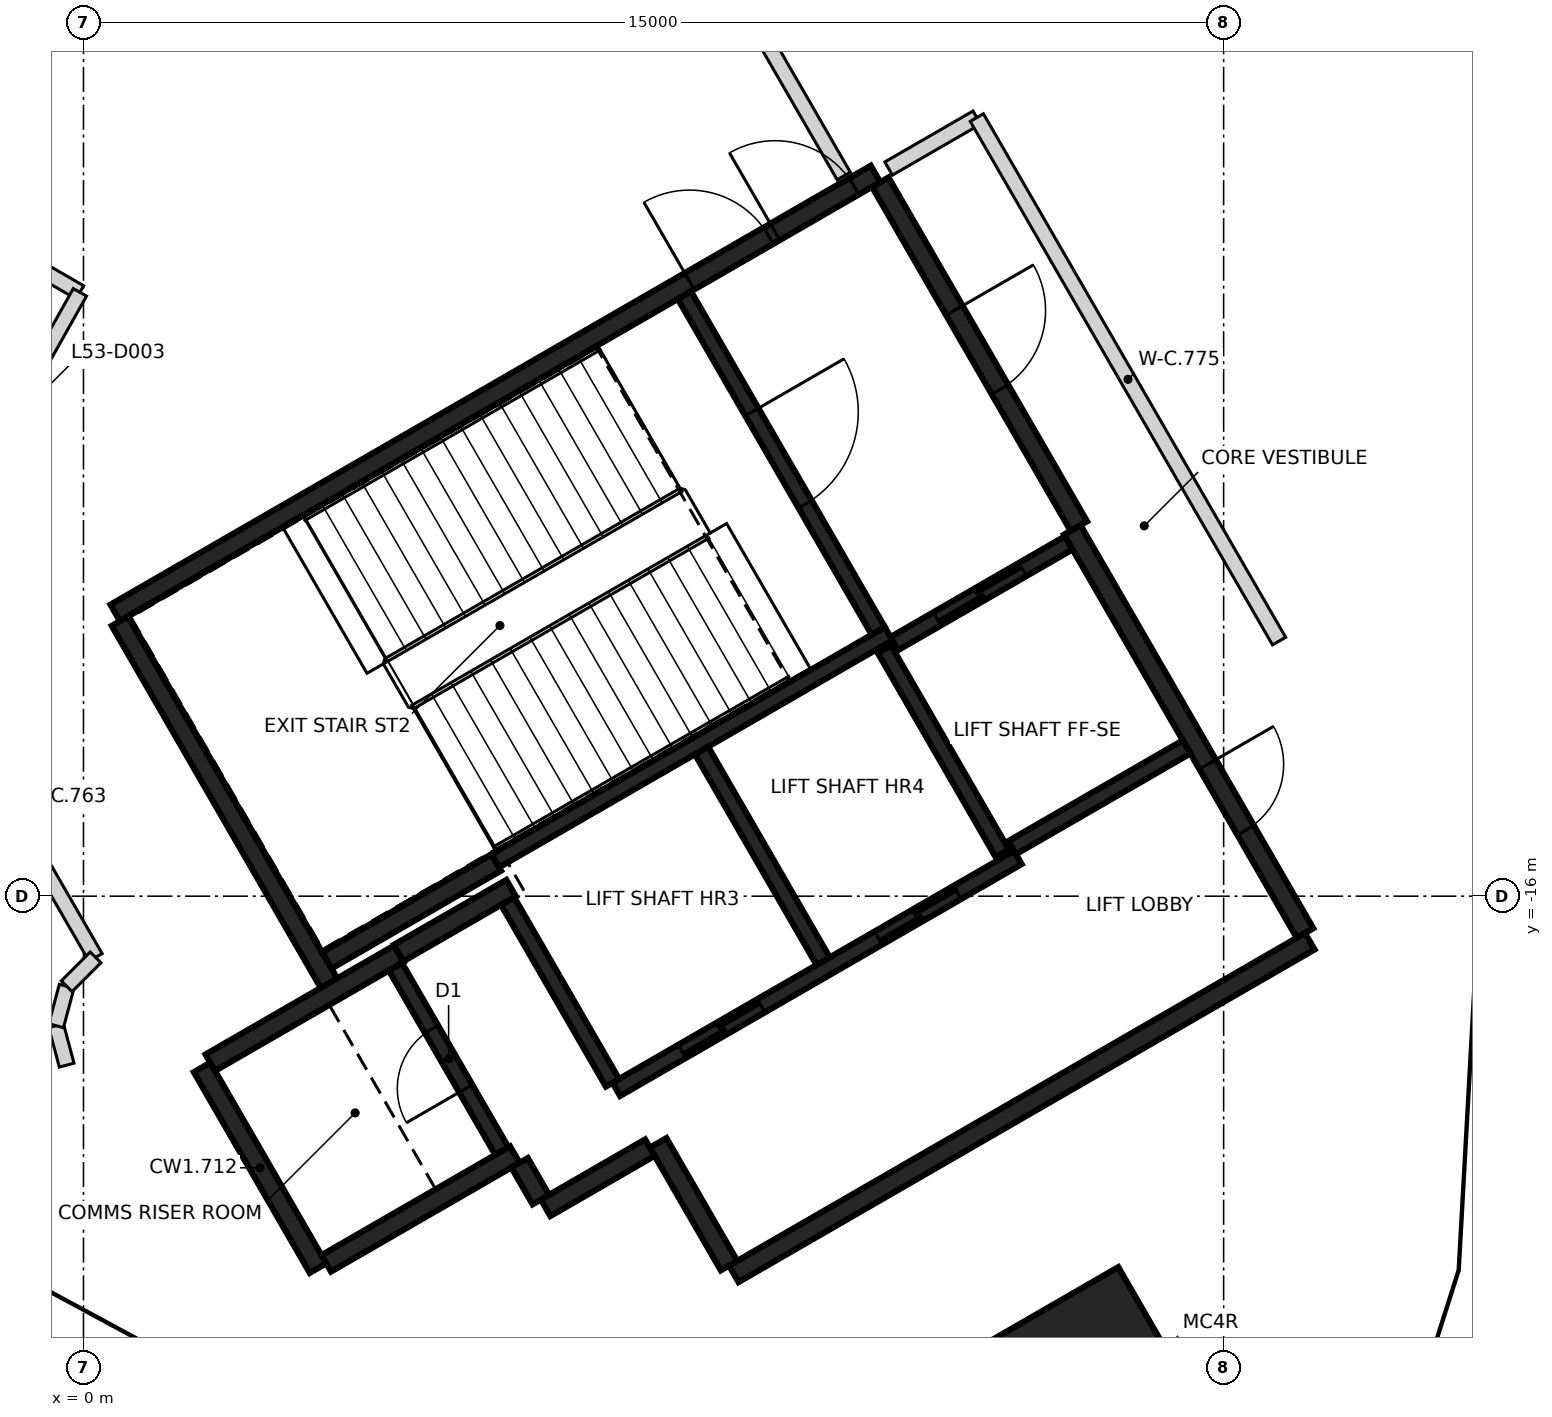
"""IFC4 building model, lengths in metres.
Left out: names, types, materials, properties, quantities, classifications, styles, units other than length and angle.
Written with IfcOpenShell. Run it as: python <this file> out.ifc"""

import sys

from ifc_helpers import new_model, si_unit, direction, frame, frame_2d, origin, origin_2d, place, context, subcontext, project, spatial, rectangle, extrude, element, fill, save


model = new_model("IFC4")
c1 = context("Model", 3, precision=1e-05, world=origin(), true_north=direction((0.0, 1.0)))
c2 = subcontext(c1, "Body", "Model", "MODEL_VIEW")
j1 = project(units=[si_unit("LENGTHUNIT", "METRE"), si_unit("PLANEANGLEUNIT", "RADIAN")], contexts=[c1])
p1 = place(None, origin())
s1 = spatial("IfcSite", under=j1, at=p1, CompositionType="ELEMENT")
p2 = place(p1, origin())
s2 = spatial("IfcBuilding", under=s1, at=p2, CompositionType="ELEMENT")
p3 = place(p2, frame((0.0, 0.0, 211.6)))
s3 = spatial("IfcBuildingStorey", under=s2, at=p3, CompositionType="ELEMENT", Elevation=211.6)
p4 = place(p3, frame((13.245, -22.941, -0.4), z_axis=(0.0, 0.0, 1.0), x_axis=(-0.5, 0.866025403784, 0.0)))
e1 = element("IfcColumn", 1, at=p4, inside=s3, PredefinedType="COLUMN", context=c2, shape_type="SweptSolid", body=[
    extrude(rectangle(XDim=3.2, YDim=2.7, at=origin_2d()), origin(), (0.0, 0.0, 1.0), 4.85),
])
p5 = place(p3, frame((0.417, -12.273, 0.0), z_axis=(0.0, 0.0, 1.0), x_axis=(0.866021906294, 0.500006057782, 0.0)))
e2 = element("IfcWall", 2, at=p5, inside=s3, PredefinedType="SHEAR", context=c2, shape_type="SweptSolid", body=[
    extrude(rectangle(XDim=11.55, YDim=0.25, at=frame_2d((5.775, 0.0))), origin(), (0.0, 0.0, 1.0), 4.45),
])
p6 = place(p5, frame((10.025, 0.0, 0.0)))
e3 = element("IfcOpeningElement", 3, at=p6, cuts=e2, PredefinedType="OPENING", context=c2, shape_type="SweptSolid", body=[
    extrude(rectangle(XDim=1.2, YDim=2.1, at=frame_2d((0.6, 1.05))), frame((0.0, 0.135, 0.0), z_axis=(0.0, -1.0, 0.0), x_axis=(1.0, 0.0, 0.0)), (0.0, 0.0, 1.0), 0.27),
])
p7 = place(p5, frame((8.725, 0.0, 0.0)))
e4 = element("IfcOpeningElement", 4, at=p7, cuts=e2, PredefinedType="OPENING", context=c2, shape_type="SweptSolid", body=[
    extrude(rectangle(XDim=1.2, YDim=2.1, at=frame_2d((0.6, 1.05))), frame((0.0, 0.135, 0.0), z_axis=(0.0, -1.0, 0.0), x_axis=(1.0, 0.0, 0.0)), (0.0, 0.0, 1.0), 0.27),
])
p8 = place(p3, frame((16.133, -16.594, 0.0), z_axis=(0.0, 0.0, 1.0), x_axis=(-0.866022959057, -0.500004234368, 0.0)))
e5 = element("IfcWall", 5, at=p8, inside=s3, PredefinedType="SHEAR", context=c2, shape_type="SweptSolid", body=[
    extrude(rectangle(XDim=8.75, YDim=0.25, at=frame_2d((4.375, 0.0))), origin(), (0.0, 0.0, 1.0), 4.45),
])
p9 = place(p3, frame((13.008, -11.181, 0.0), z_axis=(0.0, 0.0, 1.0), x_axis=(0.500001955336, -0.866024274868, 0.0)))
e6 = element("IfcWall", 6, at=p9, inside=s3, PredefinedType="SHEAR", context=c2, shape_type="SweptSolid", body=[
    extrude(rectangle(XDim=6.125, YDim=0.25, at=frame_2d((3.062, 0.0))), origin(), (0.0, 0.0, 1.0), 4.45),
])
p10 = place(p9, frame((3.563, 0.0, 0.0)))
e7 = element("IfcOpeningElement", 7, at=p10, cuts=e6, PredefinedType="OPENING", context=c2, shape_type="SweptSolid", body=[
    extrude(rectangle(XDim=1.0, YDim=2.1, at=frame_2d((0.5, 1.05))), frame((0.0, 0.135, 0.0), z_axis=(0.0, -1.0, 0.0), x_axis=(1.0, 0.0, 0.0)), (0.0, 0.0, 1.0), 0.27),
])
p11 = place(p3, frame((3.235, -17.153, 0.0), z_axis=(0.0, 0.0, 1.0), x_axis=(-0.500008851346, 0.866020293397, 0.0)))
e8 = element("IfcWall", 8, at=p11, inside=s3, PredefinedType="SHEAR", context=c2, shape_type="SweptSolid", body=[
    extrude(rectangle(XDim=5.51, YDim=0.25, at=frame_2d((2.755, 0.0))), origin(), (0.0, 0.0, 1.0), 4.45),
])
p12 = place(p3, frame((10.483, -6.606, 0.0), z_axis=(0.0, 0.0, 1.0), x_axis=(0.49999885962, -0.866026062182, 0.0)))
e9 = element("IfcWall", 9, at=p12, inside=s3, PredefinedType="SHEAR", context=c2, shape_type="SweptSolid", body=[
    extrude(rectangle(XDim=5.225, YDim=0.25, at=frame_2d((2.612, 0.0))), origin(), (0.0, 0.0, 1.0), 4.45),
])
p13 = place(p12, frame((1.95, 0.0, 0.0)))
e10 = element("IfcOpeningElement", 10, at=p13, cuts=e9, PredefinedType="OPENING", context=c2, shape_type="SweptSolid", body=[
    extrude(rectangle(XDim=1.2, YDim=2.1, at=frame_2d((0.6, 1.05))), frame((0.0, 0.135, 0.0), z_axis=(0.0, -1.0, 0.0), x_axis=(1.0, 0.0, 0.0)), (0.0, 0.0, 1.0), 0.27),
])
p14 = place(p3, frame((3.085, -20.894, 0.0), z_axis=(0.0, 0.0, 1.0), x_axis=(-0.499978833458, 0.866037623948, 0.0)))
e11 = element("IfcWall", 11, at=p14, inside=s3, PredefinedType="SHEAR", context=c2, shape_type="SweptSolid", body=[
    extrude(rectangle(XDim=3.05, YDim=0.25, at=frame_2d((1.525, 0.0))), origin(), (0.0, 0.0, 1.0), 4.45),
])
p15 = place(p3, frame((1.669, -18.19, 0.0), z_axis=(0.0, 0.0, 1.0), x_axis=(0.866042235819, 0.499970844928, 0.0)))
e12 = element("IfcWall", 12, at=p15, inside=s3, PredefinedType="SHEAR", context=c2, shape_type="SweptSolid", body=[
    extrude(rectangle(XDim=2.865, YDim=0.25, at=frame_2d((1.432, 0.0))), origin(), (0.0, 0.0, 1.0), 4.45),
])
p16 = place(p3, frame((5.675, -19.399, 0.0), z_axis=(0.0, 0.0, 1.0), x_axis=(-0.866026637627, -0.499997862916, 0.0)))
e13 = element("IfcWall", 13, at=p16, inside=s3, PredefinedType="SHEAR", context=c2, shape_type="SweptSolid", body=[
    extrude(rectangle(XDim=2.865, YDim=0.25, at=frame_2d((1.432, 0.0))), origin(), (0.0, 0.0, 1.0), 4.45),
])
p17 = place(p3, frame((5.431, -15.556, 0.0), z_axis=(0.0, 0.0, 1.0), x_axis=(-0.866022940537, -0.500004266446, 0.0)))
e14 = element("IfcWall", 14, at=p17, inside=s3, PredefinedType="SHEAR", context=c2, shape_type="SweptSolid", body=[
    extrude(rectangle(XDim=2.575, YDim=0.25, at=frame_2d((1.287, 0.0))), origin(), (0.0, 0.0, 1.0), 4.45),
])
p18 = place(p3, frame((8.493, -20.86, 0.0), z_axis=(0.0, 0.0, 1.0), x_axis=(-0.500039802285, 0.866002422705, 0.0)))
e15 = element("IfcWall", 15, at=p18, inside=s3, PredefinedType="SHEAR", context=c2, shape_type="SweptSolid", body=[
    extrude(rectangle(XDim=1.865, YDim=0.25, at=frame_2d((0.932, 0.0))), origin(), (0.0, 0.0, 1.0), 4.45),
])
p19 = place(p3, frame((4.145, -16.749, 0.0), z_axis=(0.0, 0.0, 1.0), x_axis=(0.866038183914, 0.499977863513, 0.0)))
e16 = element("IfcWall", 16, at=p19, inside=s3, PredefinedType="SHEAR", context=c2, shape_type="SweptSolid", body=[
    extrude(rectangle(XDim=1.71, YDim=0.25, at=frame_2d((0.855, 0.0))), origin(), (0.0, 0.0, 1.0), 4.45),
])
p20 = place(p3, frame((7.452, -19.308, 0.0), z_axis=(0.0, 0.0, 1.0), x_axis=(-0.866044474677, -0.49996696679, 0.0)))
e17 = element("IfcWall", 17, at=p20, inside=s3, PredefinedType="SHEAR", context=c2, shape_type="SweptSolid", body=[
    extrude(rectangle(XDim=1.584, YDim=0.25, at=frame_2d((0.792, 0.0))), origin(), (0.0, 0.0, 1.0), 4.45),
])
p21 = place(p3, frame((6.017, -19.992, 0.0), z_axis=(0.0, 0.0, 1.0), x_axis=(-0.500364886717, 0.865814633822, 0.0)))
e18 = element("IfcWall", 18, at=p21, inside=s3, PredefinedType="SHEAR", context=c2, shape_type="SweptSolid", body=[
    extrude(rectangle(XDim=0.559, YDim=0.25, at=frame_2d((0.28, 0.0))), origin(), (0.0, 0.0, 1.0), 4.45),
])
p22 = place(p3, frame((5.419, -15.534, 0.0), z_axis=(0.0, 0.0, 1.0), x_axis=(0.866029065029, 0.499993658486, 0.0)))
e19 = element("IfcWall", 19, at=p22, inside=s3, PredefinedType="SHEAR", context=c2, shape_type="SweptSolid", body=[
    extrude(rectangle(XDim=5.974, YDim=0.2, at=frame_2d((2.987, 0.0))), origin(), (0.0, 0.0, 1.0), 4.45),
])
p23 = place(p3, frame((7.01, -18.542, 0.0), z_axis=(0.0, 0.0, 1.0), x_axis=(0.866030299012, 0.499991521122, 0.0)))
e20 = element("IfcWall", 20, at=p23, inside=s3, PredefinedType="SHEAR", context=c2, shape_type="SweptSolid", body=[
    extrude(rectangle(XDim=6.1, YDim=0.2, at=frame_2d((3.05, 0.0))), origin(), (0.0, 0.0, 1.0), 4.45),
])
p24 = place(p23, frame((1.0, 0.0, 0.0)))
e21 = element("IfcOpeningElement", 21, at=p24, cuts=e20, PredefinedType="OPENING", context=c2, shape_type="SweptSolid", body=[
    extrude(rectangle(XDim=1.2, YDim=2.1, at=frame_2d((0.6, 1.05))), frame((0.0, 0.11, 0.0), z_axis=(0.0, -1.0, 0.0), x_axis=(1.0, 0.0, 0.0)), (0.0, 0.0, 1.0), 0.22),
])
p25 = place(p23, frame((3.982, 0.0, 0.0)))
e22 = element("IfcOpeningElement", 22, at=p25, cuts=e20, PredefinedType="OPENING", context=c2, shape_type="SweptSolid", body=[
    extrude(rectangle(XDim=1.2, YDim=2.1, at=frame_2d((0.6, 1.05))), frame((0.0, 0.11, 0.0), z_axis=(0.0, -1.0, 0.0), x_axis=(1.0, 0.0, 0.0)), (0.0, 0.0, 1.0), 0.22),
])
p26 = place(p3, frame((7.906, -8.094, 0.0), z_axis=(0.0, 0.0, 1.0), x_axis=(0.500027839223, -0.866009330205, 0.0)))
e23 = element("IfcWall", 23, at=p26, inside=s3, PredefinedType="SHEAR", context=c2, shape_type="SweptSolid", body=[
    extrude(rectangle(XDim=5.098, YDim=0.2, at=frame_2d((2.549, 0.0))), origin(), (0.0, 0.0, 1.0), 4.45),
])
p27 = place(p26, frame((1.774, 0.0, 0.0)))
e24 = element("IfcOpeningElement", 24, at=p27, cuts=e23, PredefinedType="OPENING", context=c2, shape_type="SweptSolid", body=[
    extrude(rectangle(XDim=1.4, YDim=2.1, at=frame_2d((0.7, 1.05))), frame((0.0, 0.11, 0.0), z_axis=(0.0, -1.0, 0.0), x_axis=(1.0, 0.0, 0.0)), (0.0, 0.0, 1.0), 0.22),
])
p28 = place(p3, frame((8.132, -14.084, 0.0), z_axis=(0.0, 0.0, 1.0), x_axis=(0.499997778408, -0.866026686418, 0.0)))
e25 = element("IfcWall", 25, at=p28, inside=s3, PredefinedType="SHEAR", context=c2, shape_type="SweptSolid", body=[
    extrude(rectangle(XDim=3.198, YDim=0.2, at=frame_2d((1.599, 0.0))), origin(), (0.0, 0.0, 1.0), 4.45),
])
p29 = place(p3, frame((5.503, -19.352, 0.0), z_axis=(0.0, 0.0, 1.0), x_axis=(-0.499986818241, 0.866033014143, 0.0)))
e26 = element("IfcWall", 26, at=p29, inside=s3, PredefinedType="SHEAR", context=c2, shape_type="SweptSolid", body=[
    extrude(rectangle(XDim=2.798, YDim=0.2, at=frame_2d((1.399, 0.0))), origin(), (0.0, 0.0, 1.0), 4.45),
])
p30 = place(p29, frame((0.949, 0.0, 0.0)))
e27 = element("IfcOpeningElement", 27, at=p30, cuts=e26, PredefinedType="OPENING", context=c2, shape_type="SweptSolid", body=[
    extrude(rectangle(XDim=0.9, YDim=2.1, at=frame_2d((0.45, 1.05))), frame((0.0, 0.11, 0.0), z_axis=(0.0, -1.0, 0.0), x_axis=(1.0, 0.0, 0.0)), (0.0, 0.0, 1.0), 0.22),
])
p31 = place(p3, frame((6.96, -18.455, 0.0), z_axis=(0.0, 0.0, 1.0), x_axis=(-0.499926705758, 0.866067716099, 0.0)))
e28 = element("IfcWall", 28, at=p31, inside=s3, PredefinedType="SHEAR", context=c2, shape_type="SweptSolid", body=[
    extrude(rectangle(XDim=2.759, YDim=0.2, at=frame_2d((1.38, 0.0))), origin(), (0.0, 0.0, 1.0), 4.45),
])
p32 = place(p3, frame((12.088, -15.437, 0.0), z_axis=(0.0, 0.0, 1.0), x_axis=(-0.500026960575, 0.86600983753, 0.0)))
e29 = element("IfcWall", 29, at=p32, inside=s3, PredefinedType="SHEAR", context=c2, shape_type="SweptSolid", body=[
    extrude(rectangle(XDim=3.1, YDim=0.2, at=frame_2d((1.55, 0.0))), origin(), (0.0, 0.0, 1.0), 4.45),
])
p33 = place(p3, frame((10.666, -12.678, 0.0), z_axis=(0.0, 0.0, 1.0), x_axis=(0.866018407898, 0.500012117035, 0.0)))
e30 = element("IfcWall", 30, at=p33, inside=s3, PredefinedType="SHEAR", context=c2, shape_type="SweptSolid", body=[
    extrude(rectangle(XDim=2.651, YDim=0.2, at=frame_2d((1.325, 0.0))), origin(), (0.0, 0.0, 1.0), 4.45),
])
p34 = place(p33, frame((0.652, 0.0, 0.0)))
e31 = element("IfcOpeningElement", 31, at=p34, cuts=e30, PredefinedType="OPENING", context=c2, shape_type="SweptSolid", body=[
    extrude(rectangle(XDim=1.3, YDim=2.1, at=frame_2d((0.65, 1.05))), frame((0.0, 0.11, 0.0), z_axis=(0.0, -1.0, 0.0), x_axis=(1.0, 0.0, 0.0)), (0.0, 0.0, 1.0), 0.22),
])
p35 = place(p3, frame((14.512, -14.037, 0.0), z_axis=(0.0, 0.0, 1.0), x_axis=(-0.866018407898, -0.500012117035, 0.0)))
e32 = element("IfcWall", 32, at=p35, inside=s3, PredefinedType="SHEAR", context=c2, shape_type="SweptSolid", body=[
    extrude(rectangle(XDim=2.651, YDim=0.2, at=frame_2d((1.325, 0.0))), origin(), (0.0, 0.0, 1.0), 4.45),
])
p36 = place(p3, frame((-7.59, -3.704, 0.0), z_axis=(0.0, 0.0, 1.0), x_axis=(0.866168783239, -0.499751577228, 0.0)))
e33 = element("IfcWall", 33, at=p36, inside=s3, PredefinedType="PARTITIONING", context=c2, shape_type="SweptSolid", body=[
    extrude(rectangle(XDim=8.708, YDim=0.2, at=frame_2d((4.354, 0.0))), origin(), (0.0, 0.0, 1.0), 4.45),
])
p37 = place(p36, frame((2.641, 0.0, 0.0)))
e34 = element("IfcOpeningElement", 34, at=p37, cuts=e33, PredefinedType="OPENING", context=c2, shape_type="SweptSolid", body=[
    extrude(rectangle(XDim=1.2, YDim=2.1, at=frame_2d((0.6, 1.05))), frame((0.0, 0.11, 0.0), z_axis=(0.0, -1.0, 0.0), x_axis=(1.0, 0.0, 0.0)), (0.0, 0.0, 1.0), 0.22),
])
p38 = place(p3, frame((-2.15, -11.797, 0.0), z_axis=(0.0, 0.0, 1.0), x_axis=(0.489969517534, 0.871739566549, 0.0)))
e35 = element("IfcWall", 35, at=p38, inside=s3, PredefinedType="PARTITIONING", context=c2, shape_type="SweptSolid", body=[
    extrude(rectangle(XDim=4.292, YDim=0.2, at=frame_2d((2.146, 0.0))), origin(), (0.0, 0.0, 1.0), 4.45),
])
p39 = place(p38, frame((1.144, 0.0, 0.0)))
e36 = element("IfcOpeningElement", 36, at=p39, cuts=e35, PredefinedType="OPENING", context=c2, shape_type="SweptSolid", body=[
    extrude(rectangle(XDim=2.0, YDim=2.1, at=frame_2d((1.0, 1.05))), frame((0.0, 0.11, 0.0), z_axis=(0.0, -1.0, 0.0), x_axis=(1.0, 0.0, 0.0)), (0.0, 0.0, 1.0), 0.22),
])
p40 = place(p3, frame((-1.978, -13.103, 0.0), z_axis=(0.0, 0.0, 1.0), x_axis=(0.49994164861, -0.866059090354, 0.0)))
e37 = element("IfcWall", 37, at=p40, inside=s3, PredefinedType="PARTITIONING", context=c2, shape_type="SweptSolid", body=[
    extrude(rectangle(XDim=4.274, YDim=0.2, at=frame_2d((2.137, 0.0))), origin(), (0.0, 0.0, 1.0), 4.45),
])
p41 = place(p3, frame((-0.36, -17.704, 0.0), z_axis=(0.0, 0.0, 1.0), x_axis=(0.259076858299, -0.965856708572, 0.0)))
e38 = element("IfcWall", 38, at=p41, inside=s3, PredefinedType="PARTITIONING", context=c2, shape_type="SweptSolid", body=[
    extrude(rectangle(XDim=0.537, YDim=0.2, at=frame_2d((0.269, 0.0))), origin(), (0.0, 0.0, 1.0), 4.45),
])
for number, where, z_axis, x_axis in (
    (39, (-0.36, -17.704, 0.0), (0.0, 0.0, 1.0), (0.259, 0.966, 0.0)),
    (40, (-0.221, -17.185, 0.0), (0.0, 0.0, 1.0), (0.707, 0.707, 0.0)),
):
    element("IfcWall", number, at=place(p3, frame(where, z_axis=z_axis, x_axis=x_axis)), inside=s3, PredefinedType="PARTITIONING", context=c2, shape_type="SweptSolid", body=[
        extrude(rectangle(XDim=0.537, YDim=0.2, at=frame_2d((0.269, 0.0))), origin(), (0.0, 0.0, 1.0), 4.45),
    ])
p42 = place(p3, frame((8.961, -4.721, 0.0), z_axis=(0.0, 0.0, 1.0), x_axis=(0.499806992981, -0.866136807766, 0.0)))
e41 = element("IfcWall", 41, at=p42, inside=s3, PredefinedType="PARTITIONING", context=c2, shape_type="SweptSolid", body=[
    extrude(rectangle(XDim=2.083, YDim=0.2, at=frame_2d((1.042, 0.0))), origin(), (0.0, 0.0, 1.0), 4.45),
])
p43 = place(p3, frame((10.593, -6.427, 0.0), z_axis=(0.0, 0.0, 1.0), x_axis=(0.865912429188, 0.500195626709, 0.0)))
e42 = element("IfcWall", 42, at=p43, inside=s3, PredefinedType="PARTITIONING", context=c2, shape_type="SweptSolid", body=[
    extrude(rectangle(XDim=1.34, YDim=0.2, at=frame_2d((0.67, 0.0))), origin(), (0.0, 0.0, 1.0), 4.45),
])
p44 = place(p3, frame((11.753, -5.757, 0.0), z_axis=(0.0, 0.0, 1.0), x_axis=(0.500058164282, -0.865991820016, 0.0)))
e43 = element("IfcWall", 43, at=p44, inside=s3, PredefinedType="PARTITIONING", context=c2, shape_type="SweptSolid", body=[
    extrude(rectangle(XDim=7.953, YDim=0.2, at=frame_2d((3.976, 0.0))), origin(), (0.0, 0.0, 1.0), 4.45),
])
p45 = place(p34, origin())
e44 = element("IfcDoor", 44, at=p45, inside=s3, OperationType="SLIDING_TO_RIGHT", PredefinedType="DOOR", context=c2, shape_type="SweptSolid", body=[
    extrude(rectangle(XDim=1.3, YDim=2.1, at=frame_2d((0.65, 1.05))), frame((0.0, 0.025, 0.0), z_axis=(0.0, -1.0, 0.0), x_axis=(1.0, 0.0, 0.0)), (0.0, 0.0, 1.0), 0.05),
])
fill(e31, e44)
p46 = place(p24, origin())
e45 = element("IfcDoor", 45, at=p46, inside=s3, OperationType="DOUBLE_DOOR_SLIDING", PredefinedType="DOOR", context=c2, shape_type="SweptSolid", body=[
    extrude(rectangle(XDim=1.2, YDim=2.1, at=frame_2d((0.6, 1.05))), frame((0.0, 0.025, 0.0), z_axis=(0.0, -1.0, 0.0), x_axis=(1.0, 0.0, 0.0)), (0.0, 0.0, 1.0), 0.05),
])
fill(e21, e45)
p47 = place(p25, origin())
e46 = element("IfcDoor", 46, at=p47, inside=s3, OperationType="DOUBLE_DOOR_SLIDING", PredefinedType="DOOR", context=c2, shape_type="SweptSolid", body=[
    extrude(rectangle(XDim=1.2, YDim=2.1, at=frame_2d((0.6, 1.05))), frame((0.0, 0.025, 0.0), z_axis=(0.0, -1.0, 0.0), x_axis=(1.0, 0.0, 0.0)), (0.0, 0.0, 1.0), 0.05),
])
fill(e22, e46)
p48 = place(p10, origin())
e47 = element("IfcDoor", 47, at=p48, inside=s3, OperationType="SINGLE_SWING_LEFT", PredefinedType="DOOR", context=c2, shape_type="SweptSolid", body=[
    extrude(rectangle(XDim=1.0, YDim=2.1, at=frame_2d((0.5, 1.05))), frame((0.0, 0.025, 0.0), z_axis=(0.0, -1.0, 0.0), x_axis=(1.0, 0.0, 0.0)), (0.0, 0.0, 1.0), 0.05),
])
fill(e7, e47)
p49 = place(p6, origin())
e48 = element("IfcDoor", 48, at=p49, inside=s3, OperationType="SINGLE_SWING_LEFT", PredefinedType="DOOR", context=c2, shape_type="SweptSolid", body=[
    extrude(rectangle(XDim=1.2, YDim=2.1, at=frame_2d((0.6, 1.05))), frame((0.0, 0.025, 0.0), z_axis=(0.0, -1.0, 0.0), x_axis=(1.0, 0.0, 0.0)), (0.0, 0.0, 1.0), 0.05),
])
fill(e3, e48)
p50 = place(p7, origin())
e49 = element("IfcDoor", 49, at=p50, inside=s3, OperationType="SINGLE_SWING_RIGHT", PredefinedType="DOOR", context=c2, shape_type="SweptSolid", body=[
    extrude(rectangle(XDim=1.2, YDim=2.1, at=frame_2d((0.6, 1.05))), frame((0.0, 0.025, 0.0), z_axis=(0.0, -1.0, 0.0), x_axis=(1.0, 0.0, 0.0)), (0.0, 0.0, 1.0), 0.05),
])
fill(e4, e49)
p51 = place(p27, origin())
e50 = element("IfcDoor", 50, at=p51, inside=s3, OperationType="SINGLE_SWING_RIGHT", PredefinedType="DOOR", context=c2, shape_type="SweptSolid", body=[
    extrude(rectangle(XDim=1.4, YDim=2.1, at=frame_2d((0.7, 1.05))), frame((0.0, 0.025, 0.0), z_axis=(0.0, -1.0, 0.0), x_axis=(1.0, 0.0, 0.0)), (0.0, 0.0, 1.0), 0.05),
])
fill(e24, e50)
p52 = place(p30, origin())
e51 = element("IfcDoor", 51, at=p52, inside=s3, OperationType="SINGLE_SWING_LEFT", PredefinedType="DOOR", context=c2, shape_type="SweptSolid", body=[
    extrude(rectangle(XDim=0.9, YDim=2.1, at=frame_2d((0.45, 1.05))), frame((0.0, 0.025, 0.0), z_axis=(0.0, -1.0, 0.0), x_axis=(1.0, 0.0, 0.0)), (0.0, 0.0, 1.0), 0.05),
])
fill(e27, e51)
p53 = place(p13, origin())
e52 = element("IfcDoor", 52, at=p53, inside=s3, OperationType="SINGLE_SWING_LEFT", PredefinedType="DOOR", context=c2, shape_type="SweptSolid", body=[
    extrude(rectangle(XDim=1.2, YDim=2.1, at=frame_2d((0.6, 1.05))), frame((0.0, 0.025, 0.0), z_axis=(0.0, -1.0, 0.0), x_axis=(1.0, 0.0, 0.0)), (0.0, 0.0, 1.0), 0.05),
])
fill(e10, e52)
save(model, sys.argv[1])
